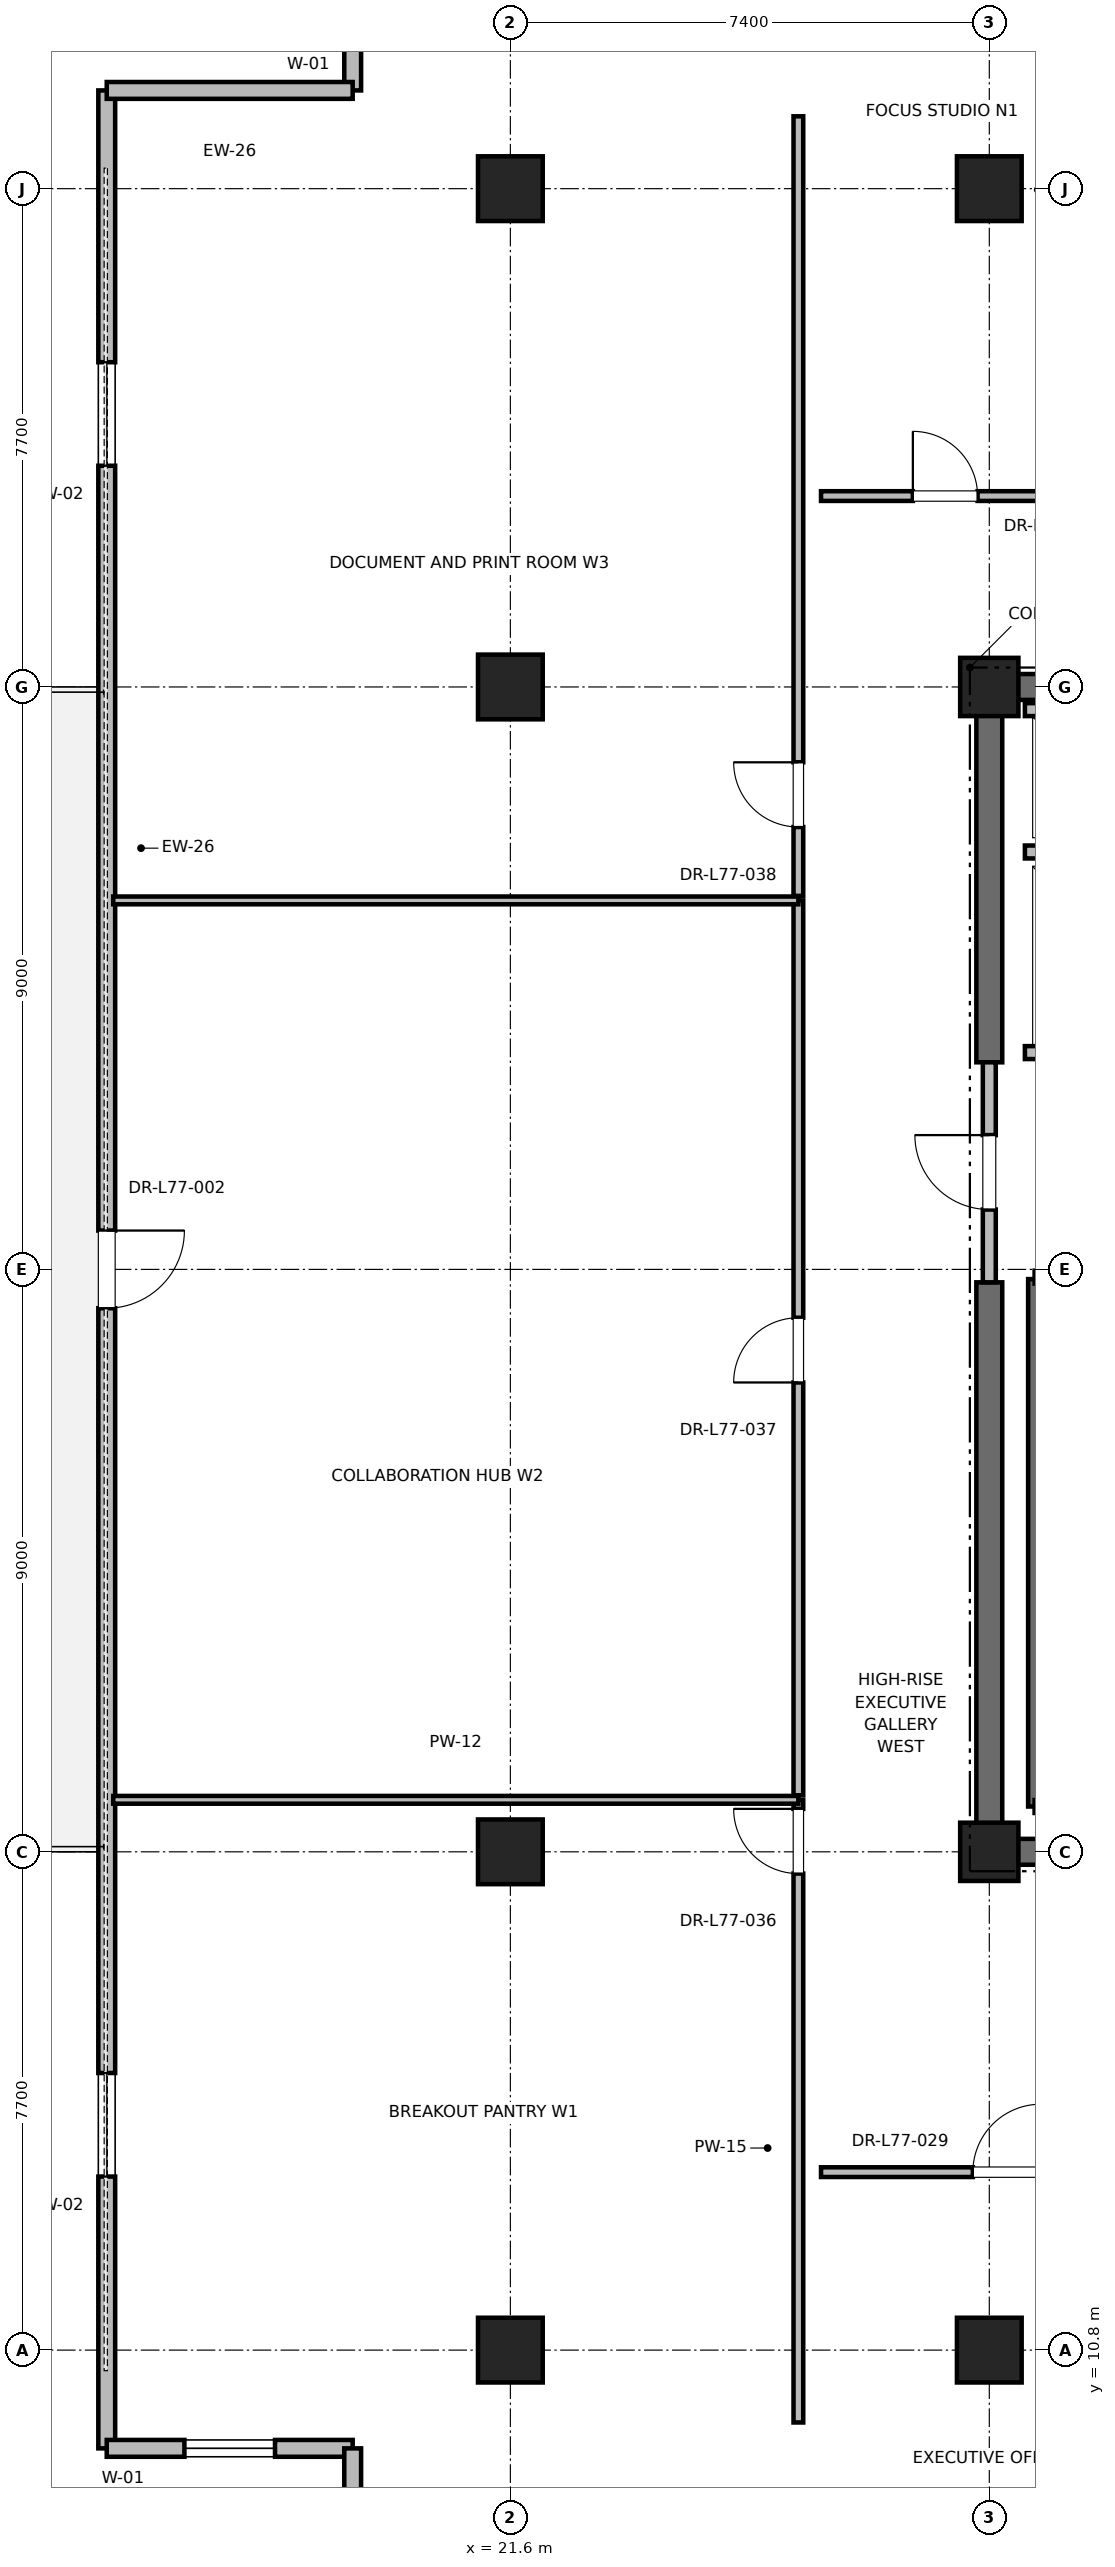
"""IFC4 building model, lengths in metres.
Left out: names, types, materials, properties, quantities, classifications, styles, units other than length and angle.
Written with IfcOpenShell. Run it as: python <this file> out.ifc"""

import sys

from ifc_helpers import new_model, si_unit, direction, frame, frame_2d, origin, origin_2d, place, context, subcontext, project, spatial, rectangle, extrude, element, fill, save


model = new_model("IFC4")
c1 = context("Model", 3, precision=1e-05, world=origin(), true_north=direction((0.0, 1.0)))
c2 = subcontext(c1, "Body", "Model", "MODEL_VIEW")
j1 = project(units=[si_unit("LENGTHUNIT", "METRE"), si_unit("PLANEANGLEUNIT", "RADIAN")], contexts=[c1])
p1 = place(None, origin())
s1 = spatial("IfcSite", under=j1, at=p1, CompositionType="ELEMENT")
p2 = place(p1, origin())
s2 = spatial("IfcBuilding", under=s1, at=p2, CompositionType="ELEMENT")
p3 = place(p2, frame((0.0, 0.0, 330.8)))
s3 = spatial("IfcBuildingStorey", under=s2, at=p3, CompositionType="ELEMENT", Elevation=330.8)
for number, where, z_axis, x_axis in (
    (1, (29.0, 10.8, 0.0), (0.0, 0.0, 1.0), (1.0, 0.0, 0.0)),
    (2, (29.0, 44.2, 0.0), (0.0, 0.0, 1.0), (1.0, 0.0, 0.0)),
    (3, (21.6, 18.5, 0.0), (0.0, 0.0, 1.0), (1.0, 0.0, 0.0)),
    (4, (21.6, 36.5, 0.0), (0.0, 0.0, 1.0), (1.0, 0.0, 0.0)),
    (5, (21.6, 10.8, 0.0), (0.0, 0.0, 1.0), (1.0, 0.0, 0.0)),
    (6, (21.6, 44.2, 0.0), (0.0, 0.0, 1.0), (1.0, 0.0, 0.0)),
):
    element("IfcColumn", number, at=place(p3, frame(where, z_axis=z_axis, x_axis=x_axis)), inside=s3, PredefinedType="COLUMN", context=c2, shape_type="SweptSolid", body=[
        extrude(rectangle(XDim=1.0, YDim=1.0, at=origin_2d()), origin(), (0.0, 0.0, 1.0), 4.0),
    ])
for number, where, z_axis, x_axis in (
    (7, (29.0, 18.5, 0.0), (0.0, 0.0, 1.0), (1.0, 0.0, 0.0)),
    (8, (29.0, 36.5, 0.0), (0.0, 0.0, 1.0), (1.0, 0.0, 0.0)),
):
    element("IfcColumn", number, at=place(p3, frame(where, z_axis=z_axis, x_axis=x_axis)), inside=s3, PredefinedType="PILASTER", context=c2, shape_type="SweptSolid", body=[
        extrude(rectangle(XDim=0.9, YDim=0.9, at=origin_2d()), origin(), (0.0, 0.0, 1.0), 4.0),
    ])
p4 = place(p3, frame((29.0, 18.5, 0.0), z_axis=(0.0, 0.0, 1.0), x_axis=(1.0, 0.0, 0.0)))
e9 = element("IfcWall", 9, at=p4, inside=s3, PredefinedType="SHEAR", context=c2, shape_type="SweptSolid", body=[
    extrude(rectangle(XDim=9.2, YDim=0.4, at=frame_2d((4.6, 0.0))), origin(), (0.0, 0.0, 1.0), 3.785),
])
p5 = place(p3, frame((29.0, 36.5, 0.0), z_axis=(0.0, 0.0, 1.0), x_axis=(1.0, 0.0, 0.0)))
e10 = element("IfcWall", 10, at=p5, inside=s3, PredefinedType="SHEAR", context=c2, shape_type="SweptSolid", body=[
    extrude(rectangle(XDim=5.8, YDim=0.4, at=frame_2d((2.9, 0.0))), origin(), (0.0, 0.0, 1.0), 3.785),
])
p6 = place(p3, frame((29.0, 18.5, 0.0), z_axis=(0.0, 0.0, 1.0), x_axis=(0.0, 1.0, 0.0)))
e11 = element("IfcWall", 11, at=p6, inside=s3, PredefinedType="SHEAR", context=c2, shape_type="SweptSolid", body=[
    extrude(rectangle(XDim=8.8, YDim=0.4, at=frame_2d((4.4, 0.0))), origin(), (0.0, 0.0, 1.0), 3.785),
])
p7 = place(p3, frame((29.0, 30.7, 0.0), z_axis=(0.0, 0.0, 1.0), x_axis=(0.0, 1.0, 0.0)))
e12 = element("IfcWall", 12, at=p7, inside=s3, PredefinedType="SHEAR", context=c2, shape_type="SweptSolid", body=[
    extrude(rectangle(XDim=5.8, YDim=0.4, at=frame_2d((2.9, 0.0))), origin(), (0.0, 0.0, 1.0), 3.785),
])
p8 = place(p3, frame((15.364, 45.718, 0.0), z_axis=(0.0, 0.0, 1.0), x_axis=(0.0, -1.0, 0.0)))
e13 = element("IfcWall", 13, at=p8, inside=s3, PredefinedType="PARAPET", context=c2, shape_type="SweptSolid", body=[
    extrude(rectangle(XDim=36.437, YDim=0.26, at=frame_2d((18.218, 0.0))), origin(), (0.0, 0.0, 1.0), 3.196),
])
p9 = place(p8, frame((4.2, 0.0, 0.85)))
e14 = element("IfcOpeningElement", 14, at=p9, cuts=e13, PredefinedType="OPENING", context=c2, shape_type="SweptSolid", body=[
    extrude(rectangle(XDim=1.6, YDim=2.1, at=frame_2d((0.8, 1.05))), frame((0.0, 0.13, 0.0), z_axis=(0.0, -1.0, 0.0), x_axis=(1.0, 0.0, 0.0)), (0.0, 0.0, 1.0), 0.26),
])
p10 = place(p8, frame((17.618, 0.0, 0.0)))
e15 = element("IfcOpeningElement", 15, at=p10, cuts=e13, PredefinedType="OPENING", context=c2, shape_type="SweptSolid", body=[
    extrude(rectangle(XDim=1.2, YDim=2.2, at=frame_2d((0.6, 1.1))), frame((0.0, 0.13, 0.0), z_axis=(0.0, -1.0, 0.0), x_axis=(1.0, 0.0, 0.0)), (0.0, 0.0, 1.0), 0.26),
])
p11 = place(p8, frame((30.636, 0.0, 0.85)))
e16 = element("IfcOpeningElement", 16, at=p11, cuts=e13, PredefinedType="OPENING", context=c2, shape_type="SweptSolid", body=[
    extrude(rectangle(XDim=1.6, YDim=2.1, at=frame_2d((0.8, 1.05))), frame((0.0, 0.13, 0.0), z_axis=(0.0, -1.0, 0.0), x_axis=(1.0, 0.0, 0.0)), (0.0, 0.0, 1.0), 0.26),
])
p12 = place(p3, frame((15.364, 9.282, 0.0), z_axis=(0.0, 0.0, 1.0), x_axis=(1.0, 0.0, 0.0)))
e17 = element("IfcWall", 17, at=p12, inside=s3, PredefinedType="PARAPET", context=c2, shape_type="SweptSolid", body=[
    extrude(rectangle(XDim=3.8, YDim=0.26, at=frame_2d((1.9, 0.0))), origin(), (0.0, 0.0, 1.0), 3.785),
])
p13 = place(p12, frame((1.2, 0.0, 0.85)))
e18 = element("IfcOpeningElement", 18, at=p13, cuts=e17, PredefinedType="OPENING", context=c2, shape_type="SweptSolid", body=[
    extrude(rectangle(XDim=1.4, YDim=2.0, at=frame_2d((0.7, 1.0))), frame((0.0, 0.13, 0.0), z_axis=(0.0, -1.0, 0.0), x_axis=(1.0, 0.0, 0.0)), (0.0, 0.0, 1.0), 0.26),
])
p14 = place(p3, frame((19.164, 9.282, 0.0), z_axis=(0.0, 0.0, 1.0), x_axis=(0.0, -1.0, 0.0)))
e19 = element("IfcWall", 19, at=p14, inside=s3, PredefinedType="PARAPET", context=c2, shape_type="SweptSolid", body=[
    extrude(rectangle(XDim=3.3, YDim=0.26, at=frame_2d((1.65, 0.0))), origin(), (0.0, 0.0, 1.0), 3.785),
])
p15 = place(p3, frame((19.164, 49.018, 0.0), z_axis=(0.0, 0.0, 1.0), x_axis=(0.0, -1.0, 0.0)))
e20 = element("IfcWall", 20, at=p15, inside=s3, PredefinedType="PARAPET", context=c2, shape_type="SweptSolid", body=[
    extrude(rectangle(XDim=3.3, YDim=0.26, at=frame_2d((1.65, 0.0))), origin(), (0.0, 0.0, 1.0), 3.785),
])
p16 = place(p15, frame((0.95, 0.0, 0.85)))
e21 = element("IfcOpeningElement", 21, at=p16, cuts=e20, PredefinedType="OPENING", context=c2, shape_type="SweptSolid", body=[
    extrude(rectangle(XDim=1.4, YDim=2.0, at=frame_2d((0.7, 1.0))), frame((0.0, 0.13, 0.0), z_axis=(0.0, -1.0, 0.0), x_axis=(1.0, 0.0, 0.0)), (0.0, 0.0, 1.0), 0.26),
])
p17 = place(p3, frame((19.164, 45.718, 0.0), z_axis=(0.0, 0.0, 1.0), x_axis=(-1.0, 0.0, 0.0)))
e22 = element("IfcWall", 22, at=p17, inside=s3, PredefinedType="PARAPET", context=c2, shape_type="SweptSolid", body=[
    extrude(rectangle(XDim=3.8, YDim=0.26, at=frame_2d((1.9, 0.0))), origin(), (0.0, 0.0, 1.0), 3.785),
])
p18 = place(p3, frame((29.7, 19.2, 0.0), z_axis=(0.0, 0.0, 1.0), x_axis=(0.0, 1.0, 0.0)))
e23 = element("IfcWall", 23, at=p18, inside=s3, PredefinedType="SOLIDWALL", context=c2, shape_type="SweptSolid", body=[
    extrude(rectangle(XDim=8.15, YDim=0.2, at=frame_2d((4.075, 0.0))), origin(), (0.0, 0.0, 1.0), 3.785),
])
p19 = place(p3, frame((29.0, 27.3, 0.0), z_axis=(0.0, 0.0, 1.0), x_axis=(0.0, 1.0, 0.0)))
e24 = element("IfcWall", 24, at=p19, inside=s3, PredefinedType="PARTITIONING", context=c2, shape_type="SweptSolid", body=[
    extrude(rectangle(XDim=3.4, YDim=0.2, at=frame_2d((1.7, 0.0))), origin(), (0.0, 0.0, 1.0), 2.865),
])
p20 = place(p19, frame((1.125, 0.0, 0.0)))
e25 = element("IfcOpeningElement", 25, at=p20, cuts=e24, PredefinedType="OPENING", context=c2, shape_type="SweptSolid", body=[
    extrude(rectangle(XDim=1.15, YDim=2.2, at=frame_2d((0.575, 1.1))), frame((0.0, 0.1, 0.0), z_axis=(0.0, -1.0, 0.0), x_axis=(1.0, 0.0, 0.0)), (0.0, 0.0, 1.0), 0.2),
])
p21 = place(p3, frame((29.55, 30.85, 0.0), z_axis=(0.0, 0.0, 1.0), x_axis=(1.0, 0.0, 0.0)))
e26 = element("IfcWall", 26, at=p21, inside=s3, PredefinedType="SOLIDWALL", context=c2, shape_type="SweptSolid", body=[
    extrude(rectangle(XDim=2.6, YDim=0.2, at=frame_2d((1.3, 0.0))), origin(), (0.0, 0.0, 1.0), 2.865),
])
p22 = place(p21, frame((0.75, 0.0, 0.0)))
e27 = element("IfcOpeningElement", 27, at=p22, cuts=e26, PredefinedType="OPENING", context=c2, shape_type="SweptSolid", body=[
    extrude(rectangle(XDim=1.1, YDim=2.2, at=frame_2d((0.55, 1.1))), frame((0.0, 0.1, 0.0), z_axis=(0.0, -1.0, 0.0), x_axis=(1.0, 0.0, 0.0)), (0.0, 0.0, 1.0), 0.2),
])
p23 = place(p3, frame((29.55, 33.95, 0.0), z_axis=(0.0, 0.0, 1.0), x_axis=(1.0, 0.0, 0.0)))
e28 = element("IfcWall", 28, at=p23, inside=s3, PredefinedType="SOLIDWALL", context=c2, shape_type="SweptSolid", body=[
    extrude(rectangle(XDim=2.8, YDim=0.2, at=frame_2d((1.4, 0.0))), origin(), (0.0, 0.0, 1.0), 3.785),
])
p24 = place(p3, frame((32.35, 36.15, 0.0), z_axis=(0.0, 0.0, 1.0), x_axis=(-1.0, 0.0, 0.0)))
e29 = element("IfcWall", 29, at=p24, inside=s3, PredefinedType="SOLIDWALL", context=c2, shape_type="SweptSolid", body=[
    extrude(rectangle(XDim=2.8, YDim=0.2, at=frame_2d((1.4, 0.0))), origin(), (0.0, 0.0, 1.0), 3.22),
])
p25 = place(p3, frame((26.4, 39.45, 0.0), z_axis=(0.0, 0.0, 1.0), x_axis=(1.0, 0.0, 0.0)))
e30 = element("IfcWall", 30, at=p25, inside=s3, PredefinedType="PARTITIONING", context=c2, shape_type="SweptSolid", body=[
    extrude(rectangle(XDim=3.808, YDim=0.15, at=frame_2d((1.904, 0.0))), origin(), (0.0, 0.0, 1.0), 2.85),
])
p26 = place(p25, frame((1.419, 0.0, 0.0)))
e31 = element("IfcOpeningElement", 31, at=p26, cuts=e30, PredefinedType="OPENING", context=c2, shape_type="SweptSolid", body=[
    extrude(rectangle(XDim=1.0, YDim=2.15, at=frame_2d((0.5, 1.075))), frame((0.0, 0.075, 0.0), z_axis=(0.0, -1.0, 0.0), x_axis=(1.0, 0.0, 0.0)), (0.0, 0.0, 1.0), 0.15),
])
p27 = place(p3, frame((26.4, 13.55, 0.0), z_axis=(0.0, 0.0, 1.0), x_axis=(1.0, 0.0, 0.0)))
e32 = element("IfcWall", 32, at=p27, inside=s3, PredefinedType="PARTITIONING", context=c2, shape_type="SweptSolid", body=[
    extrude(rectangle(XDim=5.712, YDim=0.15, at=frame_2d((2.856, 0.0))), origin(), (0.0, 0.0, 1.0), 2.85),
])
p28 = place(p27, frame((2.346, 0.0, 0.0)))
e33 = element("IfcOpeningElement", 33, at=p28, cuts=e32, PredefinedType="OPENING", context=c2, shape_type="SweptSolid", body=[
    extrude(rectangle(XDim=1.05, YDim=2.2, at=frame_2d((0.525, 1.1))), frame((0.0, 0.075, 0.0), z_axis=(0.0, -1.0, 0.0), x_axis=(1.0, 0.0, 0.0)), (0.0, 0.0, 1.0), 0.15),
])
p29 = place(p3, frame((26.05, 9.682, 0.0), z_axis=(0.0, 0.0, 1.0), x_axis=(0.0, 1.0, 0.0)))
e34 = element("IfcWall", 34, at=p29, inside=s3, PredefinedType="PARTITIONING", context=c2, shape_type="SweptSolid", body=[
    extrude(rectangle(XDim=9.622, YDim=0.15, at=frame_2d((4.811, 0.0))), origin(), (0.0, 0.0, 1.0), 2.85),
])
p30 = place(p29, frame((8.482, 0.0, 0.0)))
e35 = element("IfcOpeningElement", 35, at=p30, cuts=e34, PredefinedType="OPENING", context=c2, shape_type="SweptSolid", body=[
    extrude(rectangle(XDim=1.0, YDim=2.15, at=frame_2d((0.5, 1.075))), frame((0.0, 0.075, 0.0), z_axis=(0.0, -1.0, 0.0), x_axis=(1.0, 0.0, 0.0)), (0.0, 0.0, 1.0), 0.15),
])
p31 = place(p3, frame((15.464, 19.304, 0.0), z_axis=(0.0, 0.0, 1.0), x_axis=(1.0, 0.0, 0.0)))
e36 = element("IfcWall", 36, at=p31, inside=s3, PredefinedType="PARTITIONING", context=c2, shape_type="SweptSolid", body=[
    extrude(rectangle(XDim=10.586, YDim=0.12, at=frame_2d((5.293, 0.0))), origin(), (0.0, 0.0, 1.0), 2.85),
])
p32 = place(p3, frame((26.05, 19.374, 0.0), z_axis=(0.0, 0.0, 1.0), x_axis=(0.0, 1.0, 0.0)))
e37 = element("IfcWall", 37, at=p32, inside=s3, PredefinedType="PARTITIONING", context=c2, shape_type="SweptSolid", body=[
    extrude(rectangle(XDim=13.828, YDim=0.15, at=frame_2d((6.914, 0.0))), origin(), (0.0, 0.0, 1.0), 2.85),
])
p33 = place(p32, frame((6.379, 0.0, 0.0)))
e38 = element("IfcOpeningElement", 38, at=p33, cuts=e37, PredefinedType="OPENING", context=c2, shape_type="SweptSolid", body=[
    extrude(rectangle(XDim=1.0, YDim=2.15, at=frame_2d((0.5, 1.075))), frame((0.0, 0.075, 0.0), z_axis=(0.0, -1.0, 0.0), x_axis=(1.0, 0.0, 0.0)), (0.0, 0.0, 1.0), 0.15),
])
p34 = place(p3, frame((15.464, 33.202, 0.0), z_axis=(0.0, 0.0, 1.0), x_axis=(1.0, 0.0, 0.0)))
e39 = element("IfcWall", 39, at=p34, inside=s3, PredefinedType="PARTITIONING", context=c2, shape_type="SweptSolid", body=[
    extrude(rectangle(XDim=10.586, YDim=0.12, at=frame_2d((5.293, 0.0))), origin(), (0.0, 0.0, 1.0), 2.85),
])
p35 = place(p3, frame((26.05, 33.272, 0.0), z_axis=(0.0, 0.0, 1.0), x_axis=(0.0, 1.0, 0.0)))
e40 = element("IfcWall", 40, at=p35, inside=s3, PredefinedType="PARTITIONING", context=c2, shape_type="SweptSolid", body=[
    extrude(rectangle(XDim=12.046, YDim=0.15, at=frame_2d((6.023, 0.0))), origin(), (0.0, 0.0, 1.0), 2.85),
])
p36 = place(p35, frame((1.064, 0.0, 0.0)))
e41 = element("IfcOpeningElement", 41, at=p36, cuts=e40, PredefinedType="OPENING", context=c2, shape_type="SweptSolid", body=[
    extrude(rectangle(XDim=1.0, YDim=2.15, at=frame_2d((0.5, 1.075))), frame((0.0, 0.075, 0.0), z_axis=(0.0, -1.0, 0.0), x_axis=(1.0, 0.0, 0.0)), (0.0, 0.0, 1.0), 0.15),
])
p37 = place(p9, origin())
e42 = element("IfcWindow", 42, at=p37, inside=s3, PartitioningType="SINGLE_PANEL", PredefinedType="WINDOW", context=c2, shape_type="SweptSolid", body=[
    extrude(rectangle(XDim=1.6, YDim=2.1, at=frame_2d((0.8, 1.05))), frame((0.0, 0.03, 0.0), z_axis=(0.0, -1.0, 0.0), x_axis=(1.0, 0.0, 0.0)), (0.0, 0.0, 1.0), 0.06),
])
fill(e14, e42)
p38 = place(p10, origin())
e43 = element("IfcDoor", 43, at=p38, inside=s3, OperationType="SINGLE_SWING_LEFT", PredefinedType="DOOR", context=c2, shape_type="SweptSolid", body=[
    extrude(rectangle(XDim=1.2, YDim=2.2, at=frame_2d((0.6, 1.1))), frame((0.0, 0.025, 0.0), z_axis=(0.0, -1.0, 0.0), x_axis=(1.0, 0.0, 0.0)), (0.0, 0.0, 1.0), 0.05),
])
fill(e15, e43)
p39 = place(p11, origin())
e44 = element("IfcWindow", 44, at=p39, inside=s3, PartitioningType="SINGLE_PANEL", PredefinedType="WINDOW", context=c2, shape_type="SweptSolid", body=[
    extrude(rectangle(XDim=1.6, YDim=2.1, at=frame_2d((0.8, 1.05))), frame((0.0, 0.03, 0.0), z_axis=(0.0, -1.0, 0.0), x_axis=(1.0, 0.0, 0.0)), (0.0, 0.0, 1.0), 0.06),
])
fill(e16, e44)
p40 = place(p13, origin())
e45 = element("IfcWindow", 45, at=p40, inside=s3, PartitioningType="SINGLE_PANEL", PredefinedType="WINDOW", context=c2, shape_type="SweptSolid", body=[
    extrude(rectangle(XDim=1.4, YDim=2.0, at=frame_2d((0.7, 1.0))), frame((0.0, 0.03, 0.0), z_axis=(0.0, -1.0, 0.0), x_axis=(1.0, 0.0, 0.0)), (0.0, 0.0, 1.0), 0.06),
])
fill(e18, e45)
p41 = place(p20, origin())
e46 = element("IfcDoor", 46, at=p41, inside=s3, OperationType="SINGLE_SWING_RIGHT", PredefinedType="DOOR", context=c2, shape_type="SweptSolid", body=[
    extrude(rectangle(XDim=1.15, YDim=2.2, at=frame_2d((0.575, 1.1))), frame((0.0, 0.025, 0.0), z_axis=(0.0, -1.0, 0.0), x_axis=(1.0, 0.0, 0.0)), (0.0, 0.0, 1.0), 0.05),
])
fill(e25, e46)
p42 = place(p26, origin())
e47 = element("IfcDoor", 47, at=p42, inside=s3, OperationType="SINGLE_SWING_LEFT", PredefinedType="DOOR", context=c2, shape_type="SweptSolid", body=[
    extrude(rectangle(XDim=1.0, YDim=2.15, at=frame_2d((0.5, 1.075))), frame((0.0, 0.025, 0.0), z_axis=(0.0, -1.0, 0.0), x_axis=(1.0, 0.0, 0.0)), (0.0, 0.0, 1.0), 0.05),
])
fill(e31, e47)
p43 = place(p28, origin())
e48 = element("IfcDoor", 48, at=p43, inside=s3, OperationType="SINGLE_SWING_RIGHT", PredefinedType="DOOR", context=c2, shape_type="SweptSolid", body=[
    extrude(rectangle(XDim=1.05, YDim=2.2, at=frame_2d((0.525, 1.1))), frame((0.0, 0.025, 0.0), z_axis=(0.0, -1.0, 0.0), x_axis=(1.0, 0.0, 0.0)), (0.0, 0.0, 1.0), 0.05),
])
fill(e33, e48)
p44 = place(p30, origin())
e49 = element("IfcDoor", 49, at=p44, inside=s3, OperationType="SINGLE_SWING_RIGHT", PredefinedType="DOOR", context=c2, shape_type="SweptSolid", body=[
    extrude(rectangle(XDim=1.0, YDim=2.15, at=frame_2d((0.5, 1.075))), frame((0.0, 0.025, 0.0), z_axis=(0.0, -1.0, 0.0), x_axis=(1.0, 0.0, 0.0)), (0.0, 0.0, 1.0), 0.05),
])
fill(e35, e49)
p45 = place(p33, origin())
e50 = element("IfcDoor", 50, at=p45, inside=s3, OperationType="SINGLE_SWING_LEFT", PredefinedType="DOOR", context=c2, shape_type="SweptSolid", body=[
    extrude(rectangle(XDim=1.0, YDim=2.15, at=frame_2d((0.5, 1.075))), frame((0.0, 0.025, 0.0), z_axis=(0.0, -1.0, 0.0), x_axis=(1.0, 0.0, 0.0)), (0.0, 0.0, 1.0), 0.05),
])
fill(e38, e50)
p46 = place(p36, origin())
e51 = element("IfcDoor", 51, at=p46, inside=s3, OperationType="SINGLE_SWING_RIGHT", PredefinedType="DOOR", context=c2, shape_type="SweptSolid", body=[
    extrude(rectangle(XDim=1.0, YDim=2.15, at=frame_2d((0.5, 1.075))), frame((0.0, 0.025, 0.0), z_axis=(0.0, -1.0, 0.0), x_axis=(1.0, 0.0, 0.0)), (0.0, 0.0, 1.0), 0.05),
])
fill(e41, e51)
save(model, sys.argv[1])
